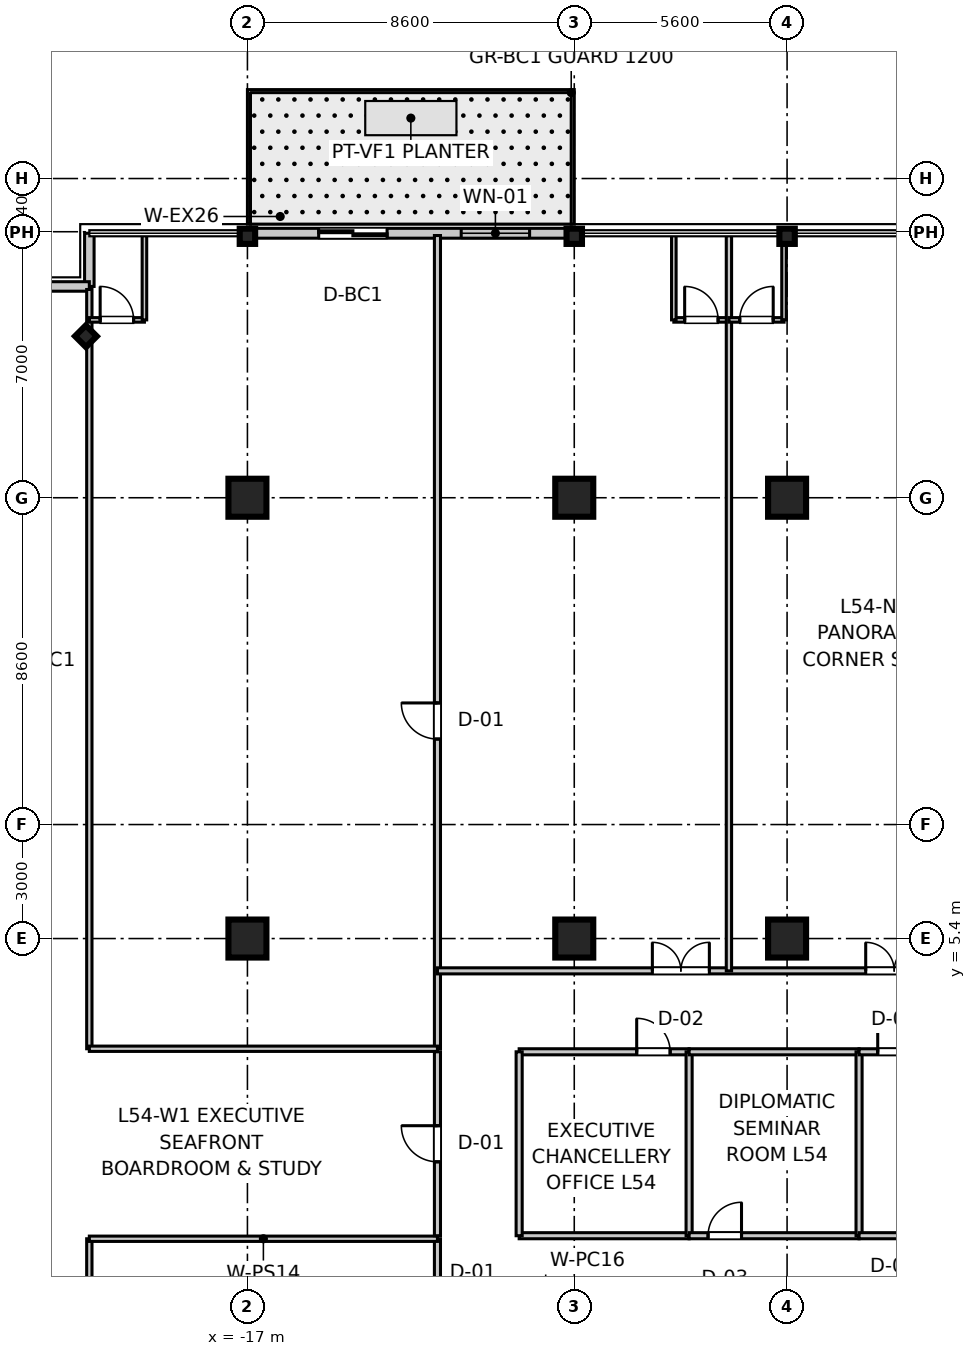
"""IFC4 building model, lengths in metres.
Left out: names, types, materials, properties, quantities, classifications, styles, units other than length and angle.
Written with IfcOpenShell. Run it as: python <this file> out.ifc"""

import sys

from ifc_helpers import new_model, si_unit, direction, frame, frame_2d, origin, origin_2d, place, context, subcontext, project, spatial, rectangle, i_section, extrude, source, transform, mapped, element, fill, save


model = new_model("IFC4")
c1 = context("Model", 3, precision=1e-05, world=origin(), true_north=direction((0.0, 1.0)))
c2 = subcontext(c1, "Body", "Model", "MODEL_VIEW")
j1 = project(units=[si_unit("LENGTHUNIT", "METRE"), si_unit("PLANEANGLEUNIT", "RADIAN")], contexts=[c1])
p1 = place(None, origin())
s1 = spatial("IfcSite", under=j1, at=p1, CompositionType="ELEMENT")
p2 = place(p1, origin())
s2 = spatial("IfcBuilding", under=s1, at=p2, CompositionType="ELEMENT")
p3 = place(p2, frame((0.0, 0.0, 212.3)))
s3 = spatial("IfcBuildingStorey", under=s2, at=p3, CompositionType="ELEMENT", Elevation=212.3)
m1 = source(origin(), c2, "Body", "SweptSolid", [
    extrude(rectangle(XDim=1.0, YDim=1.0, at=origin_2d()), origin(), (0.0, 0.0, 1.0), 3.655),
])
for number, where, z_axis, x_axis in (
    (1, (-17.0, 5.4, 0.0), (0.0, 0.0, 1.0), (1.0, 0.0, 0.0)),
    (2, (-17.0, 17.0, 0.0), (0.0, 0.0, 1.0), (1.0, 0.0, 0.0)),
    (3, (-8.4, 5.4, 0.0), (0.0, 0.0, 1.0), (1.0, 0.0, 0.0)),
    (4, (-8.4, 17.0, 0.0), (0.0, 0.0, 1.0), (1.0, 0.0, 0.0)),
    (5, (-2.8, 5.4, 0.0), (0.0, 0.0, 1.0), (1.0, 0.0, 0.0)),
    (6, (-2.8, 17.0, 0.0), (0.0, 0.0, 1.0), (1.0, 0.0, 0.0)),
):
    element("IfcColumn", number, at=place(p3, frame(where, z_axis=z_axis, x_axis=x_axis)), inside=s3, PredefinedType="COLUMN", context=c2, shape_type="MappedRepresentation", body=[
        mapped(m1, transform((0.0, 0.0, 0.0), scale=1.0)),
    ])
m2 = source(origin(), c2, "Body", "SweptSolid", [
    extrude(i_section(OverallWidth=0.401, OverallDepth=0.406, WebThickness=0.016, FlangeThickness=0.025, at=origin_2d()), origin(), (0.0, 0.0, 1.0), 3.655),
])
for number, where, z_axis, x_axis in (
    (7, (-17.0, 23.88, 0.0), (0.0, 0.0, 1.0), (0.0, 1.0, 0.0)),
    (8, (-8.4, 23.88, 0.0), (0.0, 0.0, 1.0), (0.0, 1.0, 0.0)),
    (9, (-2.8, 23.88, 0.0), (0.0, 0.0, 1.0), (0.0, 1.0, 0.0)),
    (10, (-21.25, 21.25, 0.0), (0.0, 0.0, 1.0), (0.707, 0.707, 0.0)),
):
    element("IfcColumn", number, at=place(p3, frame(where, z_axis=z_axis, x_axis=x_axis)), inside=s3, PredefinedType="COLUMN", context=c2, shape_type="MappedRepresentation", body=[
        mapped(m2, transform((0.0, 0.0, 0.0), scale=1.0)),
    ])
m3 = source(origin(), c2, "Body", "SweptSolid", [
    extrude(rectangle(XDim=1.4, YDim=0.25, at=frame_2d((0.7, 0.0))), origin(), (0.0, 0.0, 1.0), 3.41),
])
p4 = place(p3, frame((-21.16, 22.56, 0.0), z_axis=(0.0, 0.0, 1.0), x_axis=(0.0, 1.0, 0.0)))
e11 = element("IfcWall", 11, at=p4, inside=s3, PredefinedType="STANDARD", context=c2, shape_type="MappedRepresentation", body=[
    mapped(m3, transform((0.0, 0.0, 0.0), scale=1.0)),
])
m4 = source(origin(), c2, "Body", "SweptSolid", [
    extrude(rectangle(XDim=1.4, YDim=0.25, at=frame_2d((0.7, 0.0))), origin(), (0.0, 0.0, 1.0), 3.41),
])
p5 = place(p3, frame((-22.56, 22.56, 0.0), z_axis=(0.0, 0.0, 1.0), x_axis=(1.0, 0.0, 0.0)))
e12 = element("IfcWall", 12, at=p5, inside=s3, PredefinedType="STANDARD", context=c2, shape_type="MappedRepresentation", body=[
    mapped(m4, transform((0.0, 0.0, 0.0), scale=1.0)),
])
m5 = source(origin(), c2, "Body", "SweptSolid", [
    extrude(rectangle(XDim=8.6, YDim=0.26, at=frame_2d((4.3, 0.0))), origin(), (0.0, 0.0, 1.0), 2.89),
])
p6 = place(p3, frame((-17.0, 23.96, 0.0), z_axis=(0.0, 0.0, 1.0), x_axis=(1.0, 0.0, 0.0)))
e13 = element("IfcWall", 13, at=p6, inside=s3, PredefinedType="STANDARD", context=c2, shape_type="MappedRepresentation", body=[
    mapped(m5, transform((0.0, 0.0, 0.0), scale=1.0)),
])
p7 = place(p6, frame((1.875, 0.0, 0.0)))
e14 = element("IfcOpeningElement", 14, at=p7, cuts=e13, PredefinedType="OPENING", context=c2, shape_type="SweptSolid", body=[
    extrude(rectangle(XDim=1.8, YDim=2.25, at=frame_2d((0.9, 1.125))), frame((0.0, 0.14, 0.0), z_axis=(0.0, -1.0, 0.0), x_axis=(1.0, 0.0, 0.0)), (0.0, 0.0, 1.0), 0.28),
])
p8 = place(p6, frame((5.625, 0.0, 0.85)))
e15 = element("IfcOpeningElement", 15, at=p8, cuts=e13, PredefinedType="OPENING", context=c2, shape_type="SweptSolid", body=[
    extrude(rectangle(XDim=1.8, YDim=1.5, at=frame_2d((0.9, 0.75))), frame((0.0, 0.14, 0.0), z_axis=(0.0, -1.0, 0.0), x_axis=(1.0, 0.0, 0.0)), (0.0, 0.0, 1.0), 0.28),
])
m6 = source(origin(), c2, "Body", "SweptSolid", [
    extrude(rectangle(XDim=21.4, YDim=0.16, at=frame_2d((10.7, 0.0))), origin(), (0.0, 0.0, 1.0), 2.75),
])
p9 = place(p3, frame((-12.0, 2.5, 0.0), z_axis=(0.0, 0.0, 1.0), x_axis=(0.0, 1.0, 0.0)))
e16 = element("IfcWall", 16, at=p9, inside=s3, PredefinedType="PARTITIONING", context=c2, shape_type="MappedRepresentation", body=[
    mapped(m6, transform((0.0, 0.0, 0.0), scale=1.0)),
])
p10 = place(p9, frame((8.15, 0.0, 0.0)))
e17 = element("IfcOpeningElement", 17, at=p10, cuts=e16, PredefinedType="OPENING", context=c2, shape_type="SweptSolid", body=[
    extrude(rectangle(XDim=0.95, YDim=2.1, at=frame_2d((0.475, 1.05))), frame((0.0, 0.09, 0.0), z_axis=(0.0, -1.0, 0.0), x_axis=(1.0, 0.0, 0.0)), (0.0, 0.0, 1.0), 0.18),
])
m7 = source(origin(), c2, "Body", "SweptSolid", [
    extrude(rectangle(XDim=19.98, YDim=0.14, at=frame_2d((9.99, 0.0))), origin(), (0.0, 0.0, 1.0), 2.75),
])
p11 = place(p3, frame((-21.16, 2.5, 0.0), z_axis=(0.0, 0.0, 1.0), x_axis=(0.0, 1.0, 0.0)))
e18 = element("IfcWall", 18, at=p11, inside=s3, PredefinedType="PARTITIONING", context=c2, shape_type="MappedRepresentation", body=[
    mapped(m7, transform((0.0, 0.0, 0.0), scale=1.0)),
])
m8 = source(origin(), c2, "Body", "SweptSolid", [
    extrude(rectangle(XDim=9.16, YDim=0.14, at=frame_2d((4.58, 0.0))), origin(), (0.0, 0.0, 1.0), 2.75),
])
p12 = place(p3, frame((-21.16, 2.5, 0.0), z_axis=(0.0, 0.0, 1.0), x_axis=(1.0, 0.0, 0.0)))
e19 = element("IfcWall", 19, at=p12, inside=s3, PredefinedType="PARTITIONING", context=c2, shape_type="MappedRepresentation", body=[
    mapped(m8, transform((0.0, 0.0, 0.0), scale=1.0)),
])
m9 = source(origin(), c2, "Body", "SweptSolid", [
    extrude(rectangle(XDim=1.45, YDim=0.12, at=frame_2d((0.725, 0.0))), origin(), (0.0, 0.0, 1.0), 2.75),
])
p13 = place(p3, frame((-21.16, 21.68, 0.0), z_axis=(0.0, 0.0, 1.0), x_axis=(1.0, 0.0, 0.0)))
e20 = element("IfcWall", 20, at=p13, inside=s3, PredefinedType="PARTITIONING", context=c2, shape_type="MappedRepresentation", body=[
    mapped(m9, transform((0.0, 0.0, 0.0), scale=1.0)),
])
p14 = place(p13, frame((0.285, 0.0, 0.0)))
e21 = element("IfcOpeningElement", 21, at=p14, cuts=e20, PredefinedType="OPENING", context=c2, shape_type="SweptSolid", body=[
    extrude(rectangle(XDim=0.88, YDim=2.1, at=frame_2d((0.44, 1.05))), frame((0.0, 0.07, 0.0), z_axis=(0.0, -1.0, 0.0), x_axis=(1.0, 0.0, 0.0)), (0.0, 0.0, 1.0), 0.14),
])
m10 = source(origin(), c2, "Body", "SweptSolid", [
    extrude(rectangle(XDim=2.22, YDim=0.12, at=frame_2d((1.11, 0.0))), origin(), (0.0, 0.0, 1.0), 2.75),
])
p15 = place(p3, frame((-19.71, 21.68, 0.0), z_axis=(0.0, 0.0, 1.0), x_axis=(0.0, 1.0, 0.0)))
e22 = element("IfcWall", 22, at=p15, inside=s3, PredefinedType="PARTITIONING", context=c2, shape_type="MappedRepresentation", body=[
    mapped(m10, transform((0.0, 0.0, 0.0), scale=1.0)),
])
m11 = source(origin(), c2, "Body", "SweptSolid", [
    extrude(rectangle(XDim=15.34, YDim=0.16, at=frame_2d((7.67, 0.0))), origin(), (0.0, 0.0, 1.0), 2.75),
])
p16 = place(p3, frame((-12.0, 4.55, 0.0), z_axis=(0.0, 0.0, 1.0), x_axis=(1.0, 0.0, 0.0)))
e23 = element("IfcWall", 23, at=p16, inside=s3, PredefinedType="PARTITIONING", context=c2, shape_type="MappedRepresentation", body=[
    mapped(m11, transform((0.0, 0.0, 0.0), scale=1.0)),
])
p17 = place(p16, frame((5.655, 0.0, 0.0)))
e24 = element("IfcOpeningElement", 24, at=p17, cuts=e23, PredefinedType="OPENING", context=c2, shape_type="SweptSolid", body=[
    extrude(rectangle(XDim=1.5, YDim=2.15, at=frame_2d((0.75, 1.075))), frame((0.0, 0.09, 0.0), z_axis=(0.0, -1.0, 0.0), x_axis=(1.0, 0.0, 0.0)), (0.0, 0.0, 1.0), 0.18),
])
p18 = place(p16, frame((11.269, 0.0, 0.0)))
e25 = element("IfcOpeningElement", 25, at=p18, cuts=e23, PredefinedType="OPENING", context=c2, shape_type="SweptSolid", body=[
    extrude(rectangle(XDim=1.5, YDim=2.15, at=frame_2d((0.75, 1.075))), frame((0.0, 0.09, 0.0), z_axis=(0.0, -1.0, 0.0), x_axis=(1.0, 0.0, 0.0)), (0.0, 0.0, 1.0), 0.18),
])
p19 = place(p3, frame((-5.78, 21.68, 0.0), z_axis=(0.0, 0.0, 1.0), x_axis=(1.0, 0.0, 0.0)))
e26 = element("IfcWall", 26, at=p19, inside=s3, PredefinedType="PARTITIONING", context=c2, shape_type="MappedRepresentation", body=[
    mapped(m9, transform((0.0, 0.0, 0.0), scale=1.0)),
])
p20 = place(p19, frame((0.285, 0.0, 0.0)))
e27 = element("IfcOpeningElement", 27, at=p20, cuts=e26, PredefinedType="OPENING", context=c2, shape_type="SweptSolid", body=[
    extrude(rectangle(XDim=0.88, YDim=2.1, at=frame_2d((0.44, 1.05))), frame((0.0, 0.07, 0.0), z_axis=(0.0, -1.0, 0.0), x_axis=(1.0, 0.0, 0.0)), (0.0, 0.0, 1.0), 0.14),
])
p21 = place(p3, frame((-5.78, 21.68, 0.0), z_axis=(0.0, 0.0, 1.0), x_axis=(0.0, 1.0, 0.0)))
e28 = element("IfcWall", 28, at=p21, inside=s3, PredefinedType="PARTITIONING", context=c2, shape_type="MappedRepresentation", body=[
    mapped(m10, transform((0.0, 0.0, 0.0), scale=1.0)),
])
m12 = source(origin(), c2, "Body", "SweptSolid", [
    extrude(rectangle(XDim=19.35, YDim=0.14, at=frame_2d((9.675, 0.0))), origin(), (0.0, 0.0, 1.0), 2.75),
])
p22 = place(p3, frame((-4.33, 4.55, 0.0), z_axis=(0.0, 0.0, 1.0), x_axis=(0.0, 1.0, 0.0)))
e29 = element("IfcWall", 29, at=p22, inside=s3, PredefinedType="PARTITIONING", context=c2, shape_type="MappedRepresentation", body=[
    mapped(m12, transform((0.0, 0.0, 0.0), scale=1.0)),
])
m13 = source(origin(), c2, "Body", "SweptSolid", [
    extrude(rectangle(XDim=1.45, YDim=0.12, at=frame_2d((0.725, 0.0))), origin(), (0.0, 0.0, 1.0), 2.75),
])
p23 = place(p3, frame((-4.33, 21.68, 0.0), z_axis=(0.0, 0.0, 1.0), x_axis=(1.0, 0.0, 0.0)))
e30 = element("IfcWall", 30, at=p23, inside=s3, PredefinedType="PARTITIONING", context=c2, shape_type="MappedRepresentation", body=[
    mapped(m13, transform((0.0, 0.0, 0.0), scale=1.0)),
])
p24 = place(p23, frame((0.285, 0.0, 0.0)))
e31 = element("IfcOpeningElement", 31, at=p24, cuts=e30, PredefinedType="OPENING", context=c2, shape_type="SweptSolid", body=[
    extrude(rectangle(XDim=0.88, YDim=2.1, at=frame_2d((0.44, 1.05))), frame((0.0, 0.07, 0.0), z_axis=(0.0, -1.0, 0.0), x_axis=(1.0, 0.0, 0.0)), (0.0, 0.0, 1.0), 0.14),
])
p25 = place(p3, frame((-2.88, 21.68, 0.0), z_axis=(0.0, 0.0, 1.0), x_axis=(0.0, 1.0, 0.0)))
e32 = element("IfcWall", 32, at=p25, inside=s3, PredefinedType="PARTITIONING", context=c2, shape_type="MappedRepresentation", body=[
    mapped(m10, transform((0.0, 0.0, 0.0), scale=1.0)),
])
p26 = place(p3, frame((-12.0, -23.9, 0.0), z_axis=(0.0, 0.0, 1.0), x_axis=(0.0, 1.0, 0.0)))
e33 = element("IfcWall", 33, at=p26, inside=s3, PredefinedType="PARTITIONING", context=c2, shape_type="MappedRepresentation", body=[
    mapped(m6, transform((0.0, 0.0, 0.0), scale=1.0)),
])
p27 = place(p26, frame((12.3, 0.0, 0.0)))
e34 = element("IfcOpeningElement", 34, at=p27, cuts=e33, PredefinedType="OPENING", context=c2, shape_type="SweptSolid", body=[
    extrude(rectangle(XDim=0.95, YDim=2.1, at=frame_2d((0.475, 1.05))), frame((0.0, 0.09, 0.0), z_axis=(0.0, -1.0, 0.0), x_axis=(1.0, 0.0, 0.0)), (0.0, 0.0, 1.0), 0.18),
])
p28 = place(p3, frame((-21.16, -22.48, 0.0), z_axis=(0.0, 0.0, 1.0), x_axis=(0.0, 1.0, 0.0)))
e35 = element("IfcWall", 35, at=p28, inside=s3, PredefinedType="PARTITIONING", context=c2, shape_type="MappedRepresentation", body=[
    mapped(m7, transform((0.0, 0.0, 0.0), scale=1.0)),
])
p29 = place(p3, frame((-21.16, -2.5, 0.0), z_axis=(0.0, 0.0, 1.0), x_axis=(1.0, 0.0, 0.0)))
e36 = element("IfcWall", 36, at=p29, inside=s3, PredefinedType="PARTITIONING", context=c2, shape_type="MappedRepresentation", body=[
    mapped(m8, transform((0.0, 0.0, 0.0), scale=1.0)),
])
m14 = source(origin(), c2, "Body", "SweptSolid", [
    extrude(rectangle(XDim=4.84, YDim=0.16, at=frame_2d((2.42, 0.0))), origin(), (0.0, 0.0, 1.0), 2.75),
])
p30 = place(p3, frame((-12.0, -2.42, 0.0), z_axis=(0.0, 0.0, 1.0), x_axis=(0.0, 1.0, 0.0)))
e37 = element("IfcWall", 37, at=p30, inside=s3, PredefinedType="PARTITIONING", context=c2, shape_type="MappedRepresentation", body=[
    mapped(m14, transform((0.0, 0.0, 0.0), scale=1.0)),
])
p31 = place(p30, frame((1.945, 0.0, 0.0)))
e38 = element("IfcOpeningElement", 38, at=p31, cuts=e37, PredefinedType="OPENING", context=c2, shape_type="SweptSolid", body=[
    extrude(rectangle(XDim=0.95, YDim=2.1, at=frame_2d((0.475, 1.05))), frame((0.0, 0.09, 0.0), z_axis=(0.0, -1.0, 0.0), x_axis=(1.0, 0.0, 0.0)), (0.0, 0.0, 1.0), 0.18),
])
m15 = source(origin(), c2, "Body", "SweptSolid", [
    extrude(rectangle(XDim=4.472, YDim=0.16, at=frame_2d((2.236, 0.0))), origin(), (0.0, 0.0, 1.0), 2.75),
])
p32 = place(p3, frame((-9.85, -2.42, 0.0), z_axis=(0.0, 0.0, 1.0), x_axis=(1.0, 0.0, 0.0)))
e39 = element("IfcWall", 39, at=p32, inside=s3, PredefinedType="PARTITIONING", context=c2, shape_type="MappedRepresentation", body=[
    mapped(m15, transform((0.0, 0.0, 0.0), scale=1.0)),
])
p33 = place(p3, frame((-9.85, 2.42, 0.0), z_axis=(0.0, 0.0, 1.0), x_axis=(1.0, 0.0, 0.0)))
e40 = element("IfcWall", 40, at=p33, inside=s3, PredefinedType="PARTITIONING", context=c2, shape_type="MappedRepresentation", body=[
    mapped(m15, transform((0.0, 0.0, 0.0), scale=1.0)),
])
p34 = place(p33, frame((3.093, 0.0, 0.0)))
e41 = element("IfcOpeningElement", 41, at=p34, cuts=e40, PredefinedType="OPENING", context=c2, shape_type="SweptSolid", body=[
    extrude(rectangle(XDim=0.88, YDim=2.1, at=frame_2d((0.44, 1.05))), frame((0.0, 0.09, 0.0), z_axis=(0.0, -1.0, 0.0), x_axis=(1.0, 0.0, 0.0)), (0.0, 0.0, 1.0), 0.18),
])
for number, where, z_axis, x_axis in (
    (42, (-9.85, -2.42, 0.0), (0.0, 0.0, 1.0), (0.0, 1.0, 0.0)),
    (43, (-5.378, -2.42, 0.0), (0.0, 0.0, 1.0), (0.0, 1.0, 0.0)),
):
    element("IfcWall", number, at=place(p3, frame(where, z_axis=z_axis, x_axis=x_axis)), inside=s3, PredefinedType="PARTITIONING", context=c2, shape_type="MappedRepresentation", body=[
        mapped(m14, transform((0.0, 0.0, 0.0), scale=1.0)),
    ])
m16 = source(origin(), c2, "Body", "SweptSolid", [
    extrude(rectangle(XDim=4.472, YDim=0.16, at=frame_2d((2.236, 0.0))), origin(), (0.0, 0.0, 1.0), 2.75),
])
p35 = place(p3, frame((-5.378, -2.42, 0.0), z_axis=(0.0, 0.0, 1.0), x_axis=(1.0, 0.0, 0.0)))
e44 = element("IfcWall", 44, at=p35, inside=s3, PredefinedType="PARTITIONING", context=c2, shape_type="MappedRepresentation", body=[
    mapped(m16, transform((0.0, 0.0, 0.0), scale=1.0)),
])
p36 = place(p35, frame((0.499, 0.0, 0.0)))
e45 = element("IfcOpeningElement", 45, at=p36, cuts=e44, PredefinedType="OPENING", context=c2, shape_type="SweptSolid", body=[
    extrude(rectangle(XDim=0.88, YDim=2.1, at=frame_2d((0.44, 1.05))), frame((0.0, 0.09, 0.0), z_axis=(0.0, -1.0, 0.0), x_axis=(1.0, 0.0, 0.0)), (0.0, 0.0, 1.0), 0.18),
])
p37 = place(p3, frame((-5.378, 2.42, 0.0), z_axis=(0.0, 0.0, 1.0), x_axis=(1.0, 0.0, 0.0)))
e46 = element("IfcWall", 46, at=p37, inside=s3, PredefinedType="PARTITIONING", context=c2, shape_type="MappedRepresentation", body=[
    mapped(m16, transform((0.0, 0.0, 0.0), scale=1.0)),
])
p38 = place(p3, frame((-0.906, -2.42, 0.0), z_axis=(0.0, 0.0, 1.0), x_axis=(0.0, 1.0, 0.0)))
e47 = element("IfcWall", 47, at=p38, inside=s3, PredefinedType="PARTITIONING", context=c2, shape_type="MappedRepresentation", body=[
    mapped(m14, transform((0.0, 0.0, 0.0), scale=1.0)),
])
m17 = source(origin(), c2, "Body", "SweptSolid", [
    extrude(rectangle(XDim=4.128, YDim=0.16, at=frame_2d((2.064, 0.0))), origin(), (0.0, 0.0, 1.0), 2.75),
])
p39 = place(p3, frame((-0.906, -2.42, 0.0), z_axis=(0.0, 0.0, 1.0), x_axis=(1.0, 0.0, 0.0)))
e48 = element("IfcWall", 48, at=p39, inside=s3, PredefinedType="PARTITIONING", context=c2, shape_type="MappedRepresentation", body=[
    mapped(m17, transform((0.0, 0.0, 0.0), scale=1.0)),
])
p40 = place(p3, frame((-0.906, 2.42, 0.0), z_axis=(0.0, 0.0, 1.0), x_axis=(1.0, 0.0, 0.0)))
e49 = element("IfcWall", 49, at=p40, inside=s3, PredefinedType="PARTITIONING", context=c2, shape_type="MappedRepresentation", body=[
    mapped(m17, transform((0.0, 0.0, 0.0), scale=1.0)),
])
p41 = place(p40, frame((0.491, 0.0, 0.0)))
e50 = element("IfcOpeningElement", 50, at=p41, cuts=e49, PredefinedType="OPENING", context=c2, shape_type="SweptSolid", body=[
    extrude(rectangle(XDim=0.88, YDim=2.1, at=frame_2d((0.44, 1.05))), frame((0.0, 0.09, 0.0), z_axis=(0.0, -1.0, 0.0), x_axis=(1.0, 0.0, 0.0)), (0.0, 0.0, 1.0), 0.18),
])
m18 = source(origin(), c2, "Body", "SweptSolid", [
    extrude(rectangle(XDim=0.88, YDim=2.1, at=frame_2d((0.44, 1.05))), frame((0.0, 0.025, 0.0), z_axis=(0.0, -1.0, 0.0), x_axis=(1.0, 0.0, 0.0)), (0.0, 0.0, 1.0), 0.05),
])
p42 = place(p14, origin())
e51 = element("IfcDoor", 51, at=p42, inside=s3, OperationType="SINGLE_SWING_LEFT", PredefinedType="DOOR", context=c2, shape_type="MappedRepresentation", body=[
    mapped(m18, transform((0.0, 0.0, 0.0), scale=1.0)),
])
fill(e21, e51)
m19 = source(origin(), c2, "Body", "SweptSolid", [
    extrude(rectangle(XDim=0.95, YDim=2.1, at=frame_2d((0.475, 1.05))), frame((0.0, 0.025, 0.0), z_axis=(0.0, -1.0, 0.0), x_axis=(1.0, 0.0, 0.0)), (0.0, 0.0, 1.0), 0.05),
])
p43 = place(p10, origin())
e52 = element("IfcDoor", 52, at=p43, inside=s3, OperationType="SINGLE_SWING_RIGHT", PredefinedType="DOOR", context=c2, shape_type="MappedRepresentation", body=[
    mapped(m19, transform((0.0, 0.0, 0.0), scale=1.0)),
])
fill(e17, e52)
p44 = place(p20, origin())
e53 = element("IfcDoor", 53, at=p44, inside=s3, OperationType="SINGLE_SWING_LEFT", PredefinedType="DOOR", context=c2, shape_type="MappedRepresentation", body=[
    mapped(m18, transform((0.0, 0.0, 0.0), scale=1.0)),
])
fill(e27, e53)
m20 = source(origin(), c2, "Body", "SweptSolid", [
    extrude(rectangle(XDim=1.5, YDim=2.15, at=frame_2d((0.75, 1.075))), frame((0.0, 0.025, 0.0), z_axis=(0.0, -1.0, 0.0), x_axis=(1.0, 0.0, 0.0)), (0.0, 0.0, 1.0), 0.05),
])
p45 = place(p17, origin())
e54 = element("IfcDoor", 54, at=p45, inside=s3, OperationType="DOUBLE_DOOR_SINGLE_SWING", PredefinedType="DOOR", context=c2, shape_type="MappedRepresentation", body=[
    mapped(m20, transform((0.0, 0.0, 0.0), scale=1.0)),
])
fill(e24, e54)
p46 = place(p24, origin())
e55 = element("IfcDoor", 55, at=p46, inside=s3, OperationType="SINGLE_SWING_RIGHT", PredefinedType="DOOR", context=c2, shape_type="MappedRepresentation", body=[
    mapped(m18, transform((0.0, 0.0, 0.0), scale=1.0)),
])
fill(e31, e55)
p47 = place(p18, origin())
e56 = element("IfcDoor", 56, at=p47, inside=s3, OperationType="DOUBLE_DOOR_SINGLE_SWING", PredefinedType="DOOR", context=c2, shape_type="MappedRepresentation", body=[
    mapped(m20, transform((0.0, 0.0, 0.0), scale=1.0)),
])
fill(e25, e56)
p48 = place(p31, origin())
e57 = element("IfcDoor", 57, at=p48, inside=s3, OperationType="SINGLE_SWING_RIGHT", PredefinedType="DOOR", context=c2, shape_type="MappedRepresentation", body=[
    mapped(m19, transform((0.0, 0.0, 0.0), scale=1.0)),
])
fill(e38, e57)
p49 = place(p34, frame((0.88, 0.0, 0.0), z_axis=(0.0, 0.0, 1.0), x_axis=(-1.0, 0.0, 0.0)))
e58 = element("IfcDoor", 58, at=p49, inside=s3, OperationType="SINGLE_SWING_LEFT", PredefinedType="DOOR", context=c2, shape_type="MappedRepresentation", body=[
    mapped(m18, transform((0.0, 0.0, 0.0), scale=1.0)),
])
fill(e41, e58)
p50 = place(p36, origin())
e59 = element("IfcDoor", 59, at=p50, inside=s3, OperationType="SINGLE_SWING_RIGHT", PredefinedType="DOOR", context=c2, shape_type="MappedRepresentation", body=[
    mapped(m18, transform((0.0, 0.0, 0.0), scale=1.0)),
])
fill(e45, e59)
p51 = place(p41, frame((0.88, 0.0, 0.0), z_axis=(0.0, 0.0, 1.0), x_axis=(-1.0, 0.0, 0.0)))
e60 = element("IfcDoor", 60, at=p51, inside=s3, OperationType="SINGLE_SWING_LEFT", PredefinedType="DOOR", context=c2, shape_type="MappedRepresentation", body=[
    mapped(m18, transform((0.0, 0.0, 0.0), scale=1.0)),
])
fill(e50, e60)
m21 = source(origin(), c2, "Body", "SweptSolid", [
    extrude(rectangle(XDim=1.8, YDim=2.25, at=frame_2d((0.9, 1.125))), frame((0.0, 0.025, 0.0), z_axis=(0.0, -1.0, 0.0), x_axis=(1.0, 0.0, 0.0)), (0.0, 0.0, 1.0), 0.05),
])
p52 = place(p7, origin())
e61 = element("IfcDoor", 61, at=p52, inside=s3, OperationType="DOUBLE_DOOR_SLIDING", PredefinedType="DOOR", context=c2, shape_type="MappedRepresentation", body=[
    mapped(m21, transform((0.0, 0.0, 0.0), scale=1.0)),
])
fill(e14, e61)
m22 = source(origin(), c2, "Body", "SweptSolid", [
    extrude(rectangle(XDim=1.8, YDim=1.5, at=frame_2d((0.9, 0.75))), frame((0.0, 0.03, 0.0), z_axis=(0.0, -1.0, 0.0), x_axis=(1.0, 0.0, 0.0)), (0.0, 0.0, 1.0), 0.06),
])
p53 = place(p8, origin())
e62 = element("IfcWindow", 62, at=p53, inside=s3, PartitioningType="SINGLE_PANEL", PredefinedType="WINDOW", context=c2, shape_type="MappedRepresentation", body=[
    mapped(m22, transform((0.0, 0.0, 0.0), scale=1.0)),
])
fill(e15, e62)
save(model, sys.argv[1])
